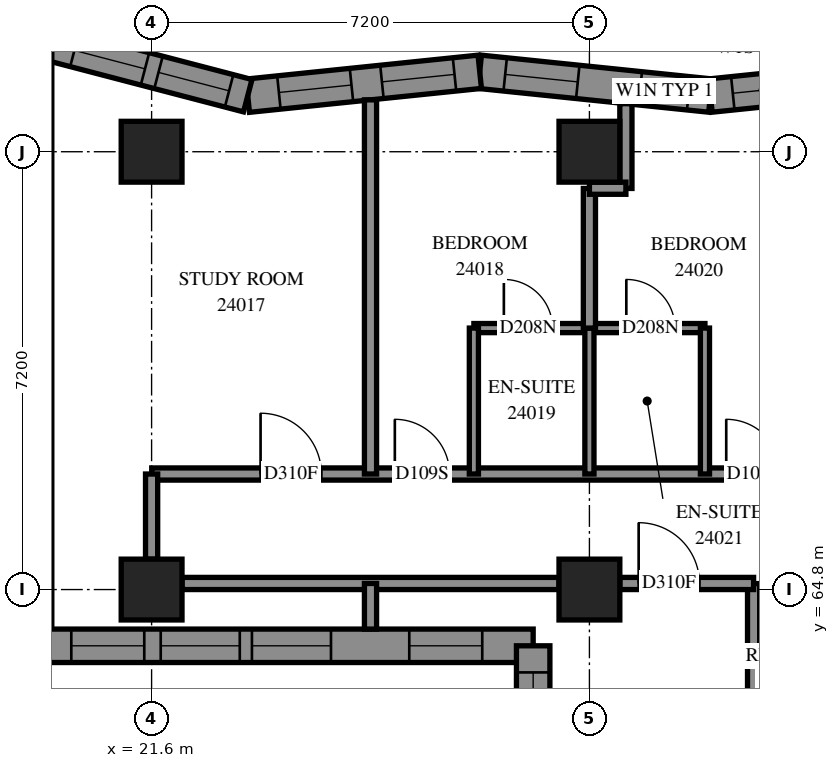
"""IFC4 building model, lengths in metres.
Left out: names, types, materials, properties, quantities, classifications, styles, units other than length and angle.
Written with IfcOpenShell. Run it as: python <this file> out.ifc"""

import sys

from ifc_helpers import new_model, si_unit, direction, frame, frame_2d, origin, origin_2d, place, context, subcontext, project, spatial, polyline, rectangle, outline, extrude, element, fill, save


model = new_model("IFC4")
c1 = context("Model", 3, precision=1e-05, world=origin(), true_north=direction((0.0, 1.0)))
c2 = subcontext(c1, "Body", "Model", "MODEL_VIEW")
j1 = project(units=[si_unit("LENGTHUNIT", "METRE"), si_unit("PLANEANGLEUNIT", "RADIAN")], contexts=[c1])
p1 = place(None, origin())
s1 = spatial("IfcSite", under=j1, at=p1, CompositionType="ELEMENT")
p2 = place(p1, origin())
s2 = spatial("IfcBuilding", under=s1, at=p2, CompositionType="ELEMENT")
p3 = place(p2, frame((0.0, 0.0, 91.4)))
s3 = spatial("IfcBuildingStorey", under=s2, at=p3, CompositionType="ELEMENT", Elevation=91.4)
for number, where, z_axis, x_axis in (
    (1, (21.6, 64.8, 0.0), (0.0, 0.0, 1.0), (1.0, 0.0, 0.0)),
    (2, (21.6, 72.0, 0.0), (0.0, 0.0, 1.0), (1.0, 0.0, 0.0)),
    (3, (28.8, 64.8, 0.0), (0.0, 0.0, 1.0), (1.0, 0.0, 0.0)),
    (4, (28.8, 72.0, 0.0), (0.0, 0.0, 1.0), (1.0, 0.0, 0.0)),
):
    element("IfcColumn", number, at=place(p3, frame(where, z_axis=z_axis, x_axis=x_axis)), inside=s3, PredefinedType="COLUMN", context=c2, shape_type="SweptSolid", body=[
        extrude(rectangle(XDim=1.0, YDim=1.0, at=origin_2d()), origin(), (0.0, 0.0, 1.0), 3.1),
    ])
p4 = place(p3, frame((34.584, 73.314, 0.0), z_axis=(0.0, 0.0, 1.0), x_axis=(-0.9947304076, -0.1025251975, 0.0)))
e5 = element("IfcWall", 5, at=p4, inside=s3, PredefinedType="SOLIDWALL", context=c2, shape_type="SweptSolid", body=[
    extrude(outline(polyline([(-0.028, -0.275), (3.785, -0.275), (3.842, 0.275), (0.028, 0.275), (-0.028, -0.275)])), origin(), (0.0, 0.0, 1.0), 3.1),
])
p5 = place(p4, frame((0.612, 0.0, 0.5)))
e6 = element("IfcOpeningElement", 6, at=p5, cuts=e5, PredefinedType="OPENING", context=c2, shape_type="SweptSolid", body=[
    extrude(rectangle(XDim=1.2, YDim=2.45, at=frame_2d((0.6, 1.225))), frame((0.0, 0.285, 0.0), z_axis=(0.0, -1.0, 0.0), x_axis=(1.0, 0.0, 0.0)), (0.0, 0.0, 1.0), 0.57),
])
p6 = place(p4, frame((2.444, 0.0, 0.45)))
e7 = element("IfcOpeningElement", 7, at=p6, cuts=e5, PredefinedType="OPENING", context=c2, shape_type="SweptSolid", body=[
    extrude(rectangle(XDim=1.0, YDim=2.5, at=frame_2d((0.5, 1.25))), frame((0.0, 0.285, 0.0), z_axis=(0.0, -1.0, 0.0), x_axis=(1.0, 0.0, 0.0)), (0.0, 0.0, 1.0), 0.57),
])
p7 = place(p3, frame((30.79, 72.924, 0.0), z_axis=(0.0, 0.0, 1.0), x_axis=(-0.9947306832, 0.1025225234, 0.0)))
e8 = element("IfcWall", 8, at=p7, inside=s3, PredefinedType="SOLIDWALL", context=c2, shape_type="SweptSolid", body=[
    extrude(outline(polyline([(0.028, -0.275), (3.842, -0.275), (3.785, 0.275), (-0.028, 0.275), (0.028, -0.275)])), origin(), (0.0, 0.0, 1.0), 3.1),
])
p8 = place(p7, frame((2.193, 0.0, 0.5)))
e9 = element("IfcOpeningElement", 9, at=p8, cuts=e8, PredefinedType="OPENING", context=c2, shape_type="SweptSolid", body=[
    extrude(rectangle(XDim=1.2, YDim=2.45, at=frame_2d((0.6, 1.225))), frame((0.0, 0.285, 0.0), z_axis=(0.0, -1.0, 0.0), x_axis=(1.0, 0.0, 0.0)), (0.0, 0.0, 1.0), 0.57),
])
p9 = place(p7, frame((0.359, 0.0, 0.45)))
e10 = element("IfcOpeningElement", 10, at=p9, cuts=e8, PredefinedType="OPENING", context=c2, shape_type="SweptSolid", body=[
    extrude(rectangle(XDim=0.8, YDim=2.5, at=frame_2d((0.4, 1.25))), frame((0.0, 0.285, 0.0), z_axis=(0.0, -1.0, 0.0), x_axis=(1.0, 0.0, 0.0)), (0.0, 0.0, 1.0), 0.57),
])
p10 = place(p3, frame((26.996, 73.314, 0.0), z_axis=(0.0, 0.0, 1.0), x_axis=(-0.9947305582, -0.1025237367, 0.0)))
e11 = element("IfcWall", 11, at=p10, inside=s3, PredefinedType="SOLIDWALL", context=c2, shape_type="SweptSolid", body=[
    extrude(outline(polyline([(-0.028, -0.275), (3.785, -0.275), (3.885, 0.275), (0.028, 0.275), (-0.028, -0.275)])), origin(), (0.0, 0.0, 1.0), 3.1),
])
p11 = place(p10, frame((0.417, 0.0, 0.5)))
e12 = element("IfcOpeningElement", 12, at=p11, cuts=e11, PredefinedType="OPENING", context=c2, shape_type="SweptSolid", body=[
    extrude(rectangle(XDim=1.2, YDim=2.45, at=frame_2d((0.6, 1.225))), frame((0.0, 0.285, 0.0), z_axis=(0.0, -1.0, 0.0), x_axis=(1.0, 0.0, 0.0)), (0.0, 0.0, 1.0), 0.57),
])
p12 = place(p10, frame((2.12, 0.0, 0.5)))
e13 = element("IfcOpeningElement", 13, at=p12, cuts=e11, PredefinedType="OPENING", context=c2, shape_type="SweptSolid", body=[
    extrude(rectangle(XDim=1.2, YDim=2.45, at=frame_2d((0.6, 1.225))), frame((0.0, 0.285, 0.0), z_axis=(0.0, -1.0, 0.0), x_axis=(1.0, 0.0, 0.0)), (0.0, 0.0, 1.0), 0.57),
])
p13 = place(p3, frame((23.181, 72.921, 0.0), z_axis=(0.0, 0.0, 1.0), x_axis=(-0.9675320185, 0.252748478, 0.0)))
e14 = element("IfcWall", 14, at=p13, inside=s3, PredefinedType="SOLIDWALL", context=c2, shape_type="SweptSolid", body=[
    extrude(outline(polyline([(0.05, -0.275), (3.971, -0.275), (3.259, 0.275), (-0.05, 0.275), (0.05, -0.275)])), origin(), (0.0, 0.0, 1.0), 3.1),
])
p14 = place(p13, frame((0.317, 0.0, 0.5)))
e15 = element("IfcOpeningElement", 15, at=p14, cuts=e14, PredefinedType="OPENING", context=c2, shape_type="SweptSolid", body=[
    extrude(rectangle(XDim=1.2, YDim=2.45, at=frame_2d((0.6, 1.225))), frame((0.0, 0.285, 0.0), z_axis=(0.0, -1.0, 0.0), x_axis=(1.0, 0.0, 0.0)), (0.0, 0.0, 1.0), 0.57),
])
p15 = place(p13, frame((1.746, 0.0, 0.5)))
e16 = element("IfcOpeningElement", 16, at=p15, cuts=e14, PredefinedType="OPENING", context=c2, shape_type="SweptSolid", body=[
    extrude(rectangle(XDim=1.2, YDim=2.45, at=frame_2d((0.6, 1.225))), frame((0.0, 0.285, 0.0), z_axis=(0.0, -1.0, 0.0), x_axis=(1.0, 0.0, 0.0)), (0.0, 0.0, 1.0), 0.57),
])
p16 = place(p3, frame((19.684, 63.875, 0.0), z_axis=(0.0, 0.0, 1.0), x_axis=(1.0, 0.0, 0.0)))
e17 = element("IfcWall", 17, at=p16, inside=s3, PredefinedType="SOLIDWALL", context=c2, shape_type="SweptSolid", body=[
    extrude(outline(polyline([(-0.275, -0.275), (7.916, -0.275), (8.466, 0.275), (0.275, 0.275), (-0.275, -0.275)])), origin(), (0.0, 0.0, 1.0), 3.1),
])
p17 = place(p16, frame((2.066, 0.0, 0.5)))
e18 = element("IfcOpeningElement", 18, at=p17, cuts=e17, PredefinedType="OPENING", context=c2, shape_type="SweptSolid", body=[
    extrude(rectangle(XDim=1.3, YDim=2.45, at=frame_2d((0.65, 1.225))), frame((0.0, 0.285, 0.0), z_axis=(0.0, -1.0, 0.0), x_axis=(1.0, 0.0, 0.0)), (0.0, 0.0, 1.0), 0.57),
])
p18 = place(p16, frame((3.566, 0.0, 0.5)))
e19 = element("IfcOpeningElement", 19, at=p18, cuts=e17, PredefinedType="OPENING", context=c2, shape_type="SweptSolid", body=[
    extrude(rectangle(XDim=1.3, YDim=2.45, at=frame_2d((0.65, 1.225))), frame((0.0, 0.285, 0.0), z_axis=(0.0, -1.0, 0.0), x_axis=(1.0, 0.0, 0.0)), (0.0, 0.0, 1.0), 0.57),
])
p19 = place(p16, frame((0.596, 0.0, 0.5)))
e20 = element("IfcOpeningElement", 20, at=p19, cuts=e17, PredefinedType="OPENING", context=c2, shape_type="SweptSolid", body=[
    extrude(rectangle(XDim=1.2, YDim=2.45, at=frame_2d((0.6, 1.225))), frame((0.0, 0.285, 0.0), z_axis=(0.0, -1.0, 0.0), x_axis=(1.0, 0.0, 0.0)), (0.0, 0.0, 1.0), 0.57),
])
p20 = place(p16, frame((6.154, 0.0, 0.5)))
e21 = element("IfcOpeningElement", 21, at=p20, cuts=e17, PredefinedType="OPENING", context=c2, shape_type="SweptSolid", body=[
    extrude(rectangle(XDim=1.2, YDim=2.45, at=frame_2d((0.6, 1.225))), frame((0.0, 0.285, 0.0), z_axis=(0.0, -1.0, 0.0), x_axis=(1.0, 0.0, 0.0)), (0.0, 0.0, 1.0), 0.57),
])
p21 = place(p3, frame((27.875, 63.875, 0.0), z_axis=(0.0, 0.0, 1.0), x_axis=(0.0, -1.0, 0.0)))
e22 = element("IfcWall", 22, at=p21, inside=s3, PredefinedType="SOLIDWALL", context=c2, shape_type="SweptSolid", body=[
    extrude(outline(polyline([(0.275, -0.275), (8.466, -0.275), (7.916, 0.275), (-0.275, 0.275), (0.275, -0.275)])), origin(), (0.0, 0.0, 1.0), 3.1),
])
p22 = place(p21, frame((4.825, 0.0, 0.5)))
e23 = element("IfcOpeningElement", 23, at=p22, cuts=e22, PredefinedType="OPENING", context=c2, shape_type="SweptSolid", body=[
    extrude(rectangle(XDim=1.3, YDim=2.45, at=frame_2d((0.65, 1.225))), frame((0.0, 0.285, 0.0), z_axis=(0.0, -1.0, 0.0), x_axis=(1.0, 0.0, 0.0)), (0.0, 0.0, 1.0), 0.57),
])
p23 = place(p21, frame((0.438, 0.0, 0.5)))
e24 = element("IfcOpeningElement", 24, at=p23, cuts=e22, PredefinedType="OPENING", context=c2, shape_type="SweptSolid", body=[
    extrude(rectangle(XDim=1.2, YDim=2.45, at=frame_2d((0.6, 1.225))), frame((0.0, 0.285, 0.0), z_axis=(0.0, -1.0, 0.0), x_axis=(1.0, 0.0, 0.0)), (0.0, 0.0, 1.0), 0.57),
])
p24 = place(p21, frame((6.396, 0.0, 0.5)))
e25 = element("IfcOpeningElement", 25, at=p24, cuts=e22, PredefinedType="OPENING", context=c2, shape_type="SweptSolid", body=[
    extrude(rectangle(XDim=1.2, YDim=2.45, at=frame_2d((0.6, 1.225))), frame((0.0, 0.285, 0.0), z_axis=(0.0, -1.0, 0.0), x_axis=(1.0, 0.0, 0.0)), (0.0, 0.0, 1.0), 0.57),
])
p25 = place(p21, frame((1.931, 0.0, 0.5)))
e26 = element("IfcOpeningElement", 26, at=p25, cuts=e22, PredefinedType="OPENING", context=c2, shape_type="SweptSolid", body=[
    extrude(rectangle(XDim=1.3, YDim=2.45, at=frame_2d((0.65, 1.225))), frame((0.0, 0.285, 0.0), z_axis=(0.0, -1.0, 0.0), x_axis=(1.0, 0.0, 0.0)), (0.0, 0.0, 1.0), 0.57),
])
p26 = place(p21, frame((3.725, 0.0, 0.45)))
e27 = element("IfcOpeningElement", 27, at=p26, cuts=e22, PredefinedType="OPENING", context=c2, shape_type="SweptSolid", body=[
    extrude(rectangle(XDim=1.0, YDim=2.5, at=frame_2d((0.5, 1.25))), frame((0.0, 0.285, 0.0), z_axis=(0.0, -1.0, 0.0), x_axis=(1.0, 0.0, 0.0)), (0.0, 0.0, 1.0), 0.57),
])
p27 = place(p3, frame((21.602, 66.7, 0.0), z_axis=(0.0, 0.0, 1.0), x_axis=(1.0, 0.0, 0.0)))
e28 = element("IfcWall", 28, at=p27, inside=s3, PredefinedType="PARTITIONING", context=c2, shape_type="SweptSolid", body=[
    extrude(rectangle(XDim=11.698, YDim=0.2, at=frame_2d((5.849, 0.0))), origin(), (0.0, 0.0, 1.0), 3.1),
])
p28 = place(p27, frame((1.79, 0.0, 0.0)))
e29 = element("IfcOpeningElement", 29, at=p28, cuts=e28, PredefinedType="OPENING", context=c2, shape_type="SweptSolid", body=[
    extrude(rectangle(XDim=1.0, YDim=2.1, at=frame_2d((0.5, 1.05))), frame((0.0, 0.11, 0.0), z_axis=(0.0, -1.0, 0.0), x_axis=(1.0, 0.0, 0.0)), (0.0, 0.0, 1.0), 0.22),
])
p29 = place(p27, frame((3.998, 0.0, 0.0)))
e30 = element("IfcOpeningElement", 30, at=p29, cuts=e28, PredefinedType="OPENING", context=c2, shape_type="SweptSolid", body=[
    extrude(rectangle(XDim=0.9, YDim=2.1, at=frame_2d((0.45, 1.05))), frame((0.0, 0.11, 0.0), z_axis=(0.0, -1.0, 0.0), x_axis=(1.0, 0.0, 0.0)), (0.0, 0.0, 1.0), 0.22),
])
p30 = place(p27, frame((9.448, 0.0, 0.0)))
e31 = element("IfcOpeningElement", 31, at=p30, cuts=e28, PredefinedType="OPENING", context=c2, shape_type="SweptSolid", body=[
    extrude(rectangle(XDim=0.9, YDim=2.1, at=frame_2d((0.45, 1.05))), frame((0.0, 0.11, 0.0), z_axis=(0.0, -1.0, 0.0), x_axis=(1.0, 0.0, 0.0)), (0.0, 0.0, 1.0), 0.22),
])
p31 = place(p3, frame((22.1, 64.9, 0.0), z_axis=(0.0, 0.0, 1.0), x_axis=(1.0, 0.0, 0.0)))
e32 = element("IfcWall", 32, at=p31, inside=s3, PredefinedType="PARTITIONING", context=c2, shape_type="SweptSolid", body=[
    extrude(rectangle(XDim=6.2, YDim=0.2, at=frame_2d((3.1, 0.0))), origin(), (0.0, 0.0, 1.0), 2.6),
])
p32 = place(p3, frame((25.2, 66.7, 0.0), z_axis=(0.0, 0.0, 1.0), x_axis=(0.0, 1.0, 0.0)))
e33 = element("IfcWall", 33, at=p32, inside=s3, PredefinedType="PARTITIONING", context=c2, shape_type="SweptSolid", body=[
    extrude(rectangle(XDim=6.153, YDim=0.2, at=frame_2d((3.076, 0.0))), origin(), (0.0, 0.0, 1.0), 3.1),
])
p33 = place(p3, frame((26.9, 69.1, 0.0), z_axis=(0.0, 0.0, 1.0), x_axis=(1.0, 0.0, 0.0)))
e34 = element("IfcWall", 34, at=p33, inside=s3, PredefinedType="PARTITIONING", context=c2, shape_type="SweptSolid", body=[
    extrude(rectangle(XDim=3.8, YDim=0.15, at=frame_2d((1.9, 0.0))), origin(), (0.0, 0.0, 1.0), 3.1),
])
p34 = place(p33, frame((0.493, 0.0, 0.0)))
e35 = element("IfcOpeningElement", 35, at=p34, cuts=e34, PredefinedType="OPENING", context=c2, shape_type="SweptSolid", body=[
    extrude(rectangle(XDim=0.8, YDim=2.1, at=frame_2d((0.4, 1.05))), frame((0.0, 0.085, 0.0), z_axis=(0.0, -1.0, 0.0), x_axis=(1.0, 0.0, 0.0)), (0.0, 0.0, 1.0), 0.17),
])
p35 = place(p33, frame((2.507, 0.0, 0.0)))
e36 = element("IfcOpeningElement", 36, at=p35, cuts=e34, PredefinedType="OPENING", context=c2, shape_type="SweptSolid", body=[
    extrude(rectangle(XDim=0.8, YDim=2.1, at=frame_2d((0.4, 1.05))), frame((0.0, 0.085, 0.0), z_axis=(0.0, -1.0, 0.0), x_axis=(1.0, 0.0, 0.0)), (0.0, 0.0, 1.0), 0.17),
])
p36 = place(p3, frame((31.5, 62.102, 0.0), z_axis=(0.0, 0.0, 1.0), x_axis=(0.0, 1.0, 0.0)))
e37 = element("IfcWall", 37, at=p36, inside=s3, PredefinedType="PARTITIONING", context=c2, shape_type="SweptSolid", body=[
    extrude(rectangle(XDim=2.796, YDim=0.2, at=frame_2d((1.398, 0.0))), origin(), (0.0, 0.0, 1.0), 3.1),
])
for number, where, z_axis, x_axis in (
    (38, (26.9, 66.7, 0.0), (0.0, 0.0, 1.0), (0.0, 1.0, 0.0)),
    (39, (28.8, 66.7, 0.0), (0.0, 0.0, 1.0), (0.0, 1.0, 0.0)),
    (40, (30.7, 66.7, 0.0), (0.0, 0.0, 1.0), (0.0, 1.0, 0.0)),
):
    element("IfcWall", number, at=place(p3, frame(where, z_axis=z_axis, x_axis=x_axis)), inside=s3, PredefinedType="PARTITIONING", context=c2, shape_type="SweptSolid", body=[
        extrude(rectangle(XDim=2.4, YDim=0.15, at=frame_2d((1.2, 0.0))), origin(), (0.0, 0.0, 1.0), 3.1),
    ])
p37 = place(p3, frame((28.8, 69.1, 0.0), z_axis=(0.0, 0.0, 1.0), x_axis=(0.0, 1.0, 0.0)))
e41 = element("IfcWall", 41, at=p37, inside=s3, PredefinedType="PARTITIONING", context=c2, shape_type="SweptSolid", body=[
    extrude(rectangle(XDim=2.296, YDim=0.2, at=frame_2d((1.148, 0.0))), origin(), (0.0, 0.0, 1.0), 3.1),
])
p38 = place(p3, frame((29.3, 64.9, 0.0), z_axis=(0.0, 0.0, 1.0), x_axis=(1.0, 0.0, 0.0)))
e42 = element("IfcWall", 42, at=p38, inside=s3, PredefinedType="PARTITIONING", context=c2, shape_type="SweptSolid", body=[
    extrude(rectangle(XDim=2.2, YDim=0.2, at=frame_2d((1.1, 0.0))), origin(), (0.0, 0.0, 1.0), 3.1),
])
p39 = place(p38, frame((0.31, 0.0, 0.0)))
e43 = element("IfcOpeningElement", 43, at=p39, cuts=e42, PredefinedType="OPENING", context=c2, shape_type="SweptSolid", body=[
    extrude(rectangle(XDim=1.0, YDim=2.1, at=frame_2d((0.5, 1.05))), frame((0.0, 0.11, 0.0), z_axis=(0.0, -1.0, 0.0), x_axis=(1.0, 0.0, 0.0)), (0.0, 0.0, 1.0), 0.22),
])
p40 = place(p3, frame((21.6, 65.3, 0.0), z_axis=(0.0, 0.0, 1.0), x_axis=(0.0, 1.0, 0.0)))
e44 = element("IfcWall", 44, at=p40, inside=s3, PredefinedType="PARTITIONING", context=c2, shape_type="SweptSolid", body=[
    extrude(rectangle(XDim=1.4, YDim=0.2, at=frame_2d((0.7, 0.0))), origin(), (0.0, 0.0, 1.0), 2.6),
])
p41 = place(p3, frame((29.4, 71.396, 0.0), z_axis=(0.0, 0.0, 1.0), x_axis=(0.0, 1.0, 0.0)))
e45 = element("IfcWall", 45, at=p41, inside=s3, PredefinedType="PARTITIONING", context=c2, shape_type="SweptSolid", body=[
    extrude(rectangle(XDim=1.394, YDim=0.2, at=frame_2d((0.697, 0.0))), origin(), (0.0, 0.0, 1.0), 3.1),
])
p42 = place(p3, frame((25.2, 64.15, 0.0), z_axis=(0.0, 0.0, 1.0), x_axis=(0.0, 1.0, 0.0)))
e46 = element("IfcWall", 46, at=p42, inside=s3, PredefinedType="PARTITIONING", context=c2, shape_type="SweptSolid", body=[
    extrude(rectangle(XDim=0.75, YDim=0.2, at=frame_2d((0.375, 0.0))), origin(), (0.0, 0.0, 1.0), 3.1),
])
p43 = place(p3, frame((28.8, 71.4, 0.0), z_axis=(0.0, 0.0, 1.0), x_axis=(1.0, 0.0, 0.0)))
e47 = element("IfcWall", 47, at=p43, inside=s3, PredefinedType="PARTITIONING", context=c2, shape_type="SweptSolid", body=[
    extrude(rectangle(XDim=0.6, YDim=0.2, at=frame_2d((0.3, 0.0))), origin(), (0.0, 0.0, 1.0), 3.1),
])
p44 = place(p8, origin())
e48 = element("IfcWindow", 48, at=p44, inside=s3, PartitioningType="SINGLE_PANEL", PredefinedType="WINDOW", context=c2, shape_type="SweptSolid", body=[
    extrude(rectangle(XDim=1.2, YDim=2.45, at=frame_2d((0.6, 1.225))), frame((0.0, 0.155, 0.0), z_axis=(0.0, -1.0, 0.0), x_axis=(1.0, 0.0, 0.0)), (0.0, 0.0, 1.0), 0.06),
])
fill(e9, e48)
p45 = place(p11, origin())
e49 = element("IfcWindow", 49, at=p45, inside=s3, PartitioningType="SINGLE_PANEL", PredefinedType="WINDOW", context=c2, shape_type="SweptSolid", body=[
    extrude(rectangle(XDim=1.2, YDim=2.45, at=frame_2d((0.6, 1.225))), frame((0.0, 0.155, 0.0), z_axis=(0.0, -1.0, 0.0), x_axis=(1.0, 0.0, 0.0)), (0.0, 0.0, 1.0), 0.06),
])
fill(e12, e49)
p46 = place(p12, origin())
e50 = element("IfcWindow", 50, at=p46, inside=s3, PartitioningType="SINGLE_PANEL", PredefinedType="WINDOW", context=c2, shape_type="SweptSolid", body=[
    extrude(rectangle(XDim=1.2, YDim=2.45, at=frame_2d((0.6, 1.225))), frame((0.0, 0.155, 0.0), z_axis=(0.0, -1.0, 0.0), x_axis=(1.0, 0.0, 0.0)), (0.0, 0.0, 1.0), 0.06),
])
fill(e13, e50)
p47 = place(p14, origin())
e51 = element("IfcWindow", 51, at=p47, inside=s3, PartitioningType="SINGLE_PANEL", PredefinedType="WINDOW", context=c2, shape_type="SweptSolid", body=[
    extrude(rectangle(XDim=1.2, YDim=2.45, at=frame_2d((0.6, 1.225))), frame((0.0, 0.155, 0.0), z_axis=(0.0, -1.0, 0.0), x_axis=(1.0, 0.0, 0.0)), (0.0, 0.0, 1.0), 0.06),
])
fill(e15, e51)
p48 = place(p15, origin())
e52 = element("IfcWindow", 52, at=p48, inside=s3, PartitioningType="SINGLE_PANEL", PredefinedType="WINDOW", context=c2, shape_type="SweptSolid", body=[
    extrude(rectangle(XDim=1.2, YDim=2.45, at=frame_2d((0.6, 1.225))), frame((0.0, 0.155, 0.0), z_axis=(0.0, -1.0, 0.0), x_axis=(1.0, 0.0, 0.0)), (0.0, 0.0, 1.0), 0.06),
])
fill(e16, e52)
p49 = place(p17, origin())
e53 = element("IfcWindow", 53, at=p49, inside=s3, PartitioningType="SINGLE_PANEL", PredefinedType="WINDOW", context=c2, shape_type="SweptSolid", body=[
    extrude(rectangle(XDim=1.3, YDim=2.45, at=frame_2d((0.65, 1.225))), frame((0.0, 0.155, 0.0), z_axis=(0.0, -1.0, 0.0), x_axis=(1.0, 0.0, 0.0)), (0.0, 0.0, 1.0), 0.06),
])
fill(e18, e53)
p50 = place(p18, origin())
e54 = element("IfcWindow", 54, at=p50, inside=s3, PartitioningType="SINGLE_PANEL", PredefinedType="WINDOW", context=c2, shape_type="SweptSolid", body=[
    extrude(rectangle(XDim=1.3, YDim=2.45, at=frame_2d((0.65, 1.225))), frame((0.0, 0.155, 0.0), z_axis=(0.0, -1.0, 0.0), x_axis=(1.0, 0.0, 0.0)), (0.0, 0.0, 1.0), 0.06),
])
fill(e19, e54)
p51 = place(p19, origin())
e55 = element("IfcWindow", 55, at=p51, inside=s3, PartitioningType="SINGLE_PANEL", PredefinedType="WINDOW", context=c2, shape_type="SweptSolid", body=[
    extrude(rectangle(XDim=1.2, YDim=2.45, at=frame_2d((0.6, 1.225))), frame((0.0, 0.155, 0.0), z_axis=(0.0, -1.0, 0.0), x_axis=(1.0, 0.0, 0.0)), (0.0, 0.0, 1.0), 0.06),
])
fill(e20, e55)
p52 = place(p20, origin())
e56 = element("IfcWindow", 56, at=p52, inside=s3, PartitioningType="SINGLE_PANEL", PredefinedType="WINDOW", context=c2, shape_type="SweptSolid", body=[
    extrude(rectangle(XDim=1.2, YDim=2.45, at=frame_2d((0.6, 1.225))), frame((0.0, 0.155, 0.0), z_axis=(0.0, -1.0, 0.0), x_axis=(1.0, 0.0, 0.0)), (0.0, 0.0, 1.0), 0.06),
])
fill(e21, e56)
p53 = place(p23, origin())
e57 = element("IfcWindow", 57, at=p53, inside=s3, PartitioningType="SINGLE_PANEL", PredefinedType="WINDOW", context=c2, shape_type="SweptSolid", body=[
    extrude(rectangle(XDim=1.2, YDim=2.45, at=frame_2d((0.6, 1.225))), frame((0.0, 0.155, 0.0), z_axis=(0.0, -1.0, 0.0), x_axis=(1.0, 0.0, 0.0)), (0.0, 0.0, 1.0), 0.06),
])
fill(e24, e57)
p54 = place(p28, origin())
e58 = element("IfcDoor", 58, at=p54, inside=s3, OperationType="SINGLE_SWING_RIGHT", PredefinedType="DOOR", context=c2, shape_type="SweptSolid", body=[
    extrude(rectangle(XDim=1.0, YDim=2.1, at=frame_2d((0.5, 1.05))), frame((0.0, 0.025, 0.0), z_axis=(0.0, -1.0, 0.0), x_axis=(1.0, 0.0, 0.0)), (0.0, 0.0, 1.0), 0.05),
])
fill(e29, e58)
p55 = place(p29, origin())
e59 = element("IfcDoor", 59, at=p55, inside=s3, OperationType="SINGLE_SWING_LEFT", PredefinedType="DOOR", context=c2, shape_type="SweptSolid", body=[
    extrude(rectangle(XDim=0.9, YDim=2.1, at=frame_2d((0.45, 1.05))), frame((0.0, 0.025, 0.0), z_axis=(0.0, -1.0, 0.0), x_axis=(1.0, 0.0, 0.0)), (0.0, 0.0, 1.0), 0.05),
])
fill(e30, e59)
p56 = place(p34, origin())
e60 = element("IfcDoor", 60, at=p56, inside=s3, OperationType="SINGLE_SWING_RIGHT", PredefinedType="DOOR", context=c2, shape_type="SweptSolid", body=[
    extrude(rectangle(XDim=0.8, YDim=2.1, at=frame_2d((0.4, 1.05))), frame((0.0, 0.025, 0.0), z_axis=(0.0, -1.0, 0.0), x_axis=(1.0, 0.0, 0.0)), (0.0, 0.0, 1.0), 0.05),
])
fill(e35, e60)
p57 = place(p30, origin())
e61 = element("IfcDoor", 61, at=p57, inside=s3, OperationType="SINGLE_SWING_RIGHT", PredefinedType="DOOR", context=c2, shape_type="SweptSolid", body=[
    extrude(rectangle(XDim=0.9, YDim=2.1, at=frame_2d((0.45, 1.05))), frame((0.0, 0.025, 0.0), z_axis=(0.0, -1.0, 0.0), x_axis=(1.0, 0.0, 0.0)), (0.0, 0.0, 1.0), 0.05),
])
fill(e31, e61)
p58 = place(p35, origin())
e62 = element("IfcDoor", 62, at=p58, inside=s3, OperationType="SINGLE_SWING_RIGHT", PredefinedType="DOOR", context=c2, shape_type="SweptSolid", body=[
    extrude(rectangle(XDim=0.8, YDim=2.1, at=frame_2d((0.4, 1.05))), frame((0.0, 0.025, 0.0), z_axis=(0.0, -1.0, 0.0), x_axis=(1.0, 0.0, 0.0)), (0.0, 0.0, 1.0), 0.05),
])
fill(e36, e62)
p59 = place(p39, origin())
e63 = element("IfcDoor", 63, at=p59, inside=s3, OperationType="SINGLE_SWING_RIGHT", PredefinedType="DOOR", context=c2, shape_type="SweptSolid", body=[
    extrude(rectangle(XDim=1.0, YDim=2.1, at=frame_2d((0.5, 1.05))), frame((0.0, 0.025, 0.0), z_axis=(0.0, -1.0, 0.0), x_axis=(1.0, 0.0, 0.0)), (0.0, 0.0, 1.0), 0.05),
])
fill(e43, e63)
p60 = place(p6, origin())
e64 = element("IfcWindow", 64, at=p60, inside=s3, PartitioningType="SINGLE_PANEL", PredefinedType="WINDOW", context=c2, shape_type="SweptSolid", body=[
    extrude(rectangle(XDim=1.0, YDim=2.5, at=frame_2d((0.5, 1.25))), frame((0.0, 0.155, 0.0), z_axis=(0.0, -1.0, 0.0), x_axis=(1.0, 0.0, 0.0)), (0.0, 0.0, 1.0), 0.06),
])
fill(e7, e64)
p61 = place(p9, origin())
e65 = element("IfcWindow", 65, at=p61, inside=s3, PartitioningType="SINGLE_PANEL", PredefinedType="WINDOW", context=c2, shape_type="SweptSolid", body=[
    extrude(rectangle(XDim=0.8, YDim=2.5, at=frame_2d((0.4, 1.25))), frame((0.0, 0.155, 0.0), z_axis=(0.0, -1.0, 0.0), x_axis=(1.0, 0.0, 0.0)), (0.0, 0.0, 1.0), 0.06),
])
fill(e10, e65)
save(model, sys.argv[1])
